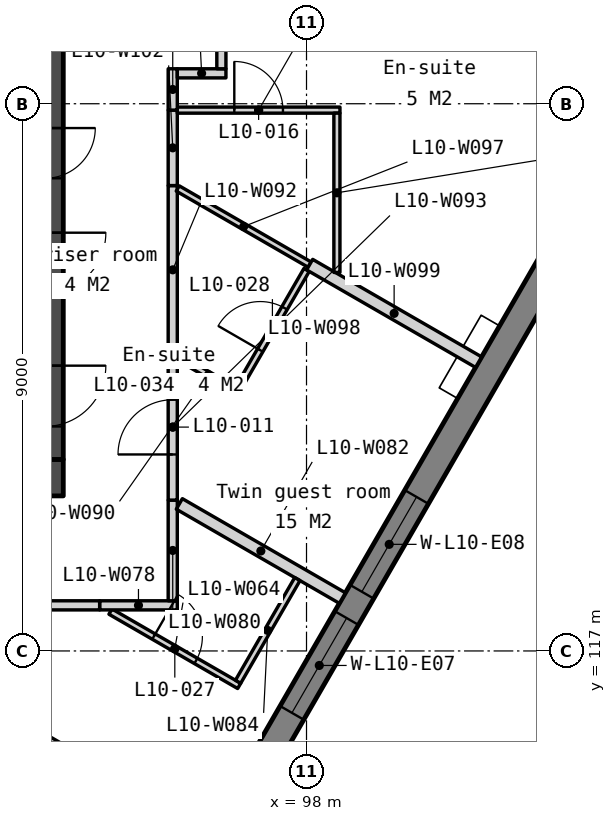
"""IFC4 building model, lengths in metres.
Left out: names, types, materials, properties, quantities, classifications, styles, units other than length and angle.
Written with IfcOpenShell. Run it as: python <this file> out.ifc"""

import sys

from ifc_helpers import new_model, si_unit, direction, frame, frame_2d, origin, place, context, subcontext, project, spatial, polyline, rectangle, outline, extrude, element, fill, save


model = new_model("IFC4")
c1 = context("Model", 3, precision=1e-05, world=origin(), true_north=direction((0.0, 1.0)))
c2 = subcontext(c1, "Body", "Model", "MODEL_VIEW")
j1 = project(units=[si_unit("LENGTHUNIT", "METRE"), si_unit("PLANEANGLEUNIT", "RADIAN")], contexts=[c1])
p1 = place(None, origin())
s1 = spatial("IfcSite", under=j1, at=p1, CompositionType="ELEMENT")
p2 = place(p1, origin())
s2 = spatial("IfcBuilding", under=s1, at=p2, CompositionType="ELEMENT")
p3 = place(p2, frame((0.0, 0.0, 49.0)))
s3 = spatial("IfcBuildingStorey", under=s2, at=p3, CompositionType="ELEMENT", Elevation=49.0)
p4 = place(p3, frame((66.0, 119.85, 0.0), z_axis=(0.0, 0.0, 1.0), x_axis=(1.0, 0.0, 0.0)))
e1 = element("IfcWall", 1, at=p4, inside=s3, PredefinedType="SOLIDWALL", context=c2, shape_type="SweptSolid", body=[
    extrude(rectangle(XDim=28.0, YDim=0.6, at=frame_2d((14.0, 0.0))), origin(), (0.0, 0.0, 1.0), 3.35),
])
p5 = place(p4, frame((6.825, 0.0, 0.0)))
e2 = element("IfcOpeningElement", 2, at=p5, cuts=e1, PredefinedType="OPENING", context=c2, shape_type="SweptSolid", body=[
    extrude(rectangle(XDim=1.8, YDim=2.1, at=frame_2d((0.9, 1.05))), frame((0.0, 0.31, 0.0), z_axis=(0.0, -1.0, 0.0), x_axis=(1.0, 0.0, 0.0)), (0.0, 0.0, 1.0), 0.62),
])
p6 = place(p4, frame((15.85, 0.0, 0.0)))
e3 = element("IfcOpeningElement", 3, at=p6, cuts=e1, PredefinedType="OPENING", context=c2, shape_type="SweptSolid", body=[
    extrude(rectangle(XDim=1.5, YDim=2.1, at=frame_2d((0.75, 1.05))), frame((0.0, 0.31, 0.0), z_axis=(0.0, -1.0, 0.0), x_axis=(1.0, 0.0, 0.0)), (0.0, 0.0, 1.0), 0.62),
])
p7 = place(p4, frame((19.375, 0.0, 0.0)))
e4 = element("IfcOpeningElement", 4, at=p7, cuts=e1, PredefinedType="OPENING", context=c2, shape_type="SweptSolid", body=[
    extrude(rectangle(XDim=1.8, YDim=2.1, at=frame_2d((0.9, 1.05))), frame((0.0, 0.31, 0.0), z_axis=(0.0, -1.0, 0.0), x_axis=(1.0, 0.0, 0.0)), (0.0, 0.0, 1.0), 0.62),
])
p8 = place(p4, frame((4.425, 0.0, 0.0)))
e5 = element("IfcOpeningElement", 5, at=p8, cuts=e1, PredefinedType="OPENING", context=c2, shape_type="SweptSolid", body=[
    extrude(rectangle(XDim=1.0, YDim=2.1, at=frame_2d((0.5, 1.05))), frame((0.0, 0.31, 0.0), z_axis=(0.0, -1.0, 0.0), x_axis=(1.0, 0.0, 0.0)), (0.0, 0.0, 1.0), 0.62),
])
p9 = place(p4, frame((9.783, 0.0, 0.0)))
e6 = element("IfcOpeningElement", 6, at=p9, cuts=e1, PredefinedType="OPENING", context=c2, shape_type="SweptSolid", body=[
    extrude(rectangle(XDim=1.0, YDim=2.1, at=frame_2d((0.5, 1.05))), frame((0.0, 0.31, 0.0), z_axis=(0.0, -1.0, 0.0), x_axis=(1.0, 0.0, 0.0)), (0.0, 0.0, 1.0), 0.62),
])
p10 = place(p4, frame((11.525, 0.0, 0.0)))
e7 = element("IfcOpeningElement", 7, at=p10, cuts=e1, PredefinedType="OPENING", context=c2, shape_type="SweptSolid", body=[
    extrude(rectangle(XDim=1.0, YDim=2.1, at=frame_2d((0.5, 1.05))), frame((0.0, 0.31, 0.0), z_axis=(0.0, -1.0, 0.0), x_axis=(1.0, 0.0, 0.0)), (0.0, 0.0, 1.0), 0.62),
])
p11 = place(p4, frame((13.658, 0.0, 0.0)))
e8 = element("IfcOpeningElement", 8, at=p11, cuts=e1, PredefinedType="OPENING", context=c2, shape_type="SweptSolid", body=[
    extrude(rectangle(XDim=1.0, YDim=2.1, at=frame_2d((0.5, 1.05))), frame((0.0, 0.31, 0.0), z_axis=(0.0, -1.0, 0.0), x_axis=(1.0, 0.0, 0.0)), (0.0, 0.0, 1.0), 0.62),
])
p12 = place(p4, frame((21.725, 0.0, 0.0)))
e9 = element("IfcOpeningElement", 9, at=p12, cuts=e1, PredefinedType="OPENING", context=c2, shape_type="SweptSolid", body=[
    extrude(rectangle(XDim=1.0, YDim=2.1, at=frame_2d((0.5, 1.05))), frame((0.0, 0.31, 0.0), z_axis=(0.0, -1.0, 0.0), x_axis=(1.0, 0.0, 0.0)), (0.0, 0.0, 1.0), 0.62),
])
p13 = place(p4, frame((23.425, 0.0, 0.0)))
e10 = element("IfcOpeningElement", 10, at=p13, cuts=e1, PredefinedType="OPENING", context=c2, shape_type="SweptSolid", body=[
    extrude(rectangle(XDim=1.0, YDim=2.1, at=frame_2d((0.5, 1.05))), frame((0.0, 0.31, 0.0), z_axis=(0.0, -1.0, 0.0), x_axis=(1.0, 0.0, 0.0)), (0.0, 0.0, 1.0), 0.62),
])
p14 = place(p3, frame((93.7, 133.95, 0.0), z_axis=(0.0, 0.0, 1.0), x_axis=(0.0, -1.0, 0.0)))
e11 = element("IfcWall", 11, at=p14, inside=s3, PredefinedType="SOLIDWALL", context=c2, shape_type="SweptSolid", body=[
    extrude(rectangle(XDim=13.8, YDim=0.6, at=frame_2d((6.9, 0.0))), origin(), (0.0, 0.0, 1.0), 3.35),
])
p15 = place(p14, frame((0.6, 0.0, 0.0)))
e12 = element("IfcOpeningElement", 12, at=p15, cuts=e11, PredefinedType="OPENING", context=c2, shape_type="SweptSolid", body=[
    extrude(rectangle(XDim=1.1, YDim=2.1, at=frame_2d((0.55, 1.05))), frame((0.0, 0.31, 0.0), z_axis=(0.0, -1.0, 0.0), x_axis=(1.0, 0.0, 0.0)), (0.0, 0.0, 1.0), 0.62),
])
p16 = place(p14, frame((8.35, 0.0, 0.0)))
e13 = element("IfcOpeningElement", 13, at=p16, cuts=e11, PredefinedType="OPENING", context=c2, shape_type="SweptSolid", body=[
    extrude(rectangle(XDim=0.826, YDim=2.1, at=frame_2d((0.413, 1.05))), frame((0.0, 0.31, 0.0), z_axis=(0.0, -1.0, 0.0), x_axis=(1.0, 0.0, 0.0)), (0.0, 0.0, 1.0), 0.62),
])
p17 = place(p14, frame((10.071, 0.0, 0.0)))
e14 = element("IfcOpeningElement", 14, at=p17, cuts=e11, PredefinedType="OPENING", context=c2, shape_type="SweptSolid", body=[
    extrude(rectangle(XDim=1.0, YDim=2.1, at=frame_2d((0.5, 1.05))), frame((0.0, 0.31, 0.0), z_axis=(0.0, -1.0, 0.0), x_axis=(1.0, 0.0, 0.0)), (0.0, 0.0, 1.0), 0.62),
])
p18 = place(p14, frame((12.258, 0.0, 0.0)))
e15 = element("IfcOpeningElement", 15, at=p18, cuts=e11, PredefinedType="OPENING", context=c2, shape_type="SweptSolid", body=[
    extrude(rectangle(XDim=1.0, YDim=2.1, at=frame_2d((0.5, 1.05))), frame((0.0, 0.31, 0.0), z_axis=(0.0, -1.0, 0.0), x_axis=(1.0, 0.0, 0.0)), (0.0, 0.0, 1.0), 0.62),
])
p19 = place(p3, frame((83.105, 90.599, -0.15), z_axis=(0.0, 0.0, 1.0), x_axis=(0.499999201451, 0.866025864826, 0.0)))
e16 = element("IfcWall", 16, at=p19, inside=s3, PredefinedType="SOLIDWALL", context=c2, shape_type="SweptSolid", body=[
    extrude(outline(polyline([(44.8, 0.0), (44.8, 3.5), (0.0, 3.5), (0.0, 0.0), (44.8, 0.0)])), frame((0.0, 0.225, 0.0), z_axis=(0.0, -1.0, 0.0), x_axis=(1.0, 0.0, 0.0)), (0.0, 0.0, 1.0), 0.45),
])
p20 = place(p19, frame((2.43, 0.0, 1.05)))
e17 = element("IfcOpeningElement", 17, at=p20, cuts=e16, PredefinedType="OPENING", context=c2, shape_type="SweptSolid", body=[
    extrude(rectangle(XDim=1.8, YDim=1.5, at=frame_2d((0.9, 0.75))), frame((0.0, 0.235, 0.0), z_axis=(0.0, -1.0, 0.0), x_axis=(1.0, 0.0, 0.0)), (0.0, 0.0, 1.0), 0.47),
])
p21 = place(p19, frame((4.73, 0.0, 1.05)))
e18 = element("IfcOpeningElement", 18, at=p21, cuts=e16, PredefinedType="OPENING", context=c2, shape_type="SweptSolid", body=[
    extrude(rectangle(XDim=1.8, YDim=1.5, at=frame_2d((0.9, 0.75))), frame((0.0, 0.235, 0.0), z_axis=(0.0, -1.0, 0.0), x_axis=(1.0, 0.0, 0.0)), (0.0, 0.0, 1.0), 0.47),
])
p22 = place(p19, frame((11.39, 0.0, 1.05)))
e19 = element("IfcOpeningElement", 19, at=p22, cuts=e16, PredefinedType="OPENING", context=c2, shape_type="SweptSolid", body=[
    extrude(rectangle(XDim=1.8, YDim=1.5, at=frame_2d((0.9, 0.75))), frame((0.0, 0.235, 0.0), z_axis=(0.0, -1.0, 0.0), x_axis=(1.0, 0.0, 0.0)), (0.0, 0.0, 1.0), 0.47),
])
p23 = place(p19, frame((13.69, 0.0, 1.05)))
e20 = element("IfcOpeningElement", 20, at=p23, cuts=e16, PredefinedType="OPENING", context=c2, shape_type="SweptSolid", body=[
    extrude(rectangle(XDim=1.8, YDim=1.5, at=frame_2d((0.9, 0.75))), frame((0.0, 0.235, 0.0), z_axis=(0.0, -1.0, 0.0), x_axis=(1.0, 0.0, 0.0)), (0.0, 0.0, 1.0), 0.47),
])
p24 = place(p19, frame((20.35, 0.0, 1.05)))
e21 = element("IfcOpeningElement", 21, at=p24, cuts=e16, PredefinedType="OPENING", context=c2, shape_type="SweptSolid", body=[
    extrude(rectangle(XDim=1.8, YDim=1.5, at=frame_2d((0.9, 0.75))), frame((0.0, 0.235, 0.0), z_axis=(0.0, -1.0, 0.0), x_axis=(1.0, 0.0, 0.0)), (0.0, 0.0, 1.0), 0.47),
])
p25 = place(p19, frame((22.65, 0.0, 1.05)))
e22 = element("IfcOpeningElement", 22, at=p25, cuts=e16, PredefinedType="OPENING", context=c2, shape_type="SweptSolid", body=[
    extrude(rectangle(XDim=1.8, YDim=1.5, at=frame_2d((0.9, 0.75))), frame((0.0, 0.235, 0.0), z_axis=(0.0, -1.0, 0.0), x_axis=(1.0, 0.0, 0.0)), (0.0, 0.0, 1.0), 0.47),
])
p26 = place(p19, frame((29.31, 0.0, 1.05)))
e23 = element("IfcOpeningElement", 23, at=p26, cuts=e16, PredefinedType="OPENING", context=c2, shape_type="SweptSolid", body=[
    extrude(rectangle(XDim=1.8, YDim=1.5, at=frame_2d((0.9, 0.75))), frame((0.0, 0.235, 0.0), z_axis=(0.0, -1.0, 0.0), x_axis=(1.0, 0.0, 0.0)), (0.0, 0.0, 1.0), 0.47),
])
p27 = place(p19, frame((31.61, 0.0, 1.05)))
e24 = element("IfcOpeningElement", 24, at=p27, cuts=e16, PredefinedType="OPENING", context=c2, shape_type="SweptSolid", body=[
    extrude(rectangle(XDim=1.8, YDim=1.5, at=frame_2d((0.9, 0.75))), frame((0.0, 0.235, 0.0), z_axis=(0.0, -1.0, 0.0), x_axis=(1.0, 0.0, 0.0)), (0.0, 0.0, 1.0), 0.47),
])
p28 = place(p19, frame((38.27, 0.0, 1.05)))
e25 = element("IfcOpeningElement", 25, at=p28, cuts=e16, PredefinedType="OPENING", context=c2, shape_type="SweptSolid", body=[
    extrude(rectangle(XDim=1.8, YDim=1.5, at=frame_2d((0.9, 0.75))), frame((0.0, 0.235, 0.0), z_axis=(0.0, -1.0, 0.0), x_axis=(1.0, 0.0, 0.0)), (0.0, 0.0, 1.0), 0.47),
])
p29 = place(p19, frame((40.57, 0.0, 1.05)))
e26 = element("IfcOpeningElement", 26, at=p29, cuts=e16, PredefinedType="OPENING", context=c2, shape_type="SweptSolid", body=[
    extrude(rectangle(XDim=1.8, YDim=1.5, at=frame_2d((0.9, 0.75))), frame((0.0, 0.235, 0.0), z_axis=(0.0, -1.0, 0.0), x_axis=(1.0, 0.0, 0.0)), (0.0, 0.0, 1.0), 0.47),
])
p30 = place(p3, frame((92.497, 116.215, 0.0), z_axis=(0.0, 0.0, 1.0), x_axis=(0.866012907634, -0.500021643343, 0.0)))
e27 = element("IfcWall", 27, at=p30, inside=s3, PredefinedType="PARTITIONING", context=c2, shape_type="SweptSolid", body=[
    extrude(rectangle(XDim=4.45, YDim=0.2, at=frame_2d((2.225, 0.0))), origin(), (0.0, 0.0, 1.0), 3.35),
])
p31 = place(p3, frame((94.775, 117.647, 0.0), z_axis=(0.0, 0.0, 1.0), x_axis=(0.86604092097, -0.499973122483, 0.0)))
e28 = element("IfcWall", 28, at=p31, inside=s3, PredefinedType="PARTITIONING", context=c2, shape_type="SweptSolid", body=[
    extrude(rectangle(XDim=2.445, YDim=0.1, at=frame_2d((1.223, 0.0))), origin(), (0.0, 0.0, 1.0), 3.35),
])
p32 = place(p31, frame((0.823, 0.0, 0.0)))
e29 = element("IfcOpeningElement", 29, at=p32, cuts=e28, PredefinedType="OPENING", context=c2, shape_type="SweptSolid", body=[
    extrude(rectangle(XDim=0.8, YDim=2.1, at=frame_2d((0.4, 1.05))), frame((0.0, 0.06, 0.0), z_axis=(0.0, -1.0, 0.0), x_axis=(1.0, 0.0, 0.0)), (0.0, 0.0, 1.0), 0.12),
])
p33 = place(p3, frame((94.598, 117.75, 0.0), z_axis=(0.0, 0.0, 1.0), x_axis=(1.0, 0.0, 0.0)))
e30 = element("IfcWall", 30, at=p33, inside=s3, PredefinedType="PARTITIONING", context=c2, shape_type="SweptSolid", body=[
    extrude(rectangle(XDim=1.277, YDim=0.15, at=frame_2d((0.639, 0.0))), origin(), (0.0, 0.0, 1.0), 3.35),
])
p34 = place(p3, frame((90.034, 117.75, 0.0), z_axis=(0.0, 0.0, 1.0), x_axis=(1.0, 0.0, 0.0)))
e31 = element("IfcWall", 31, at=p34, inside=s3, PredefinedType="PARTITIONING", context=c2, shape_type="SweptSolid", body=[
    extrude(rectangle(XDim=4.564, YDim=0.15, at=frame_2d((2.282, 0.0))), origin(), (0.0, 0.0, 1.0), 3.35),
])
p35 = place(p34, frame((1.832, 0.0, 0.0)))
e32 = element("IfcOpeningElement", 32, at=p35, cuts=e31, PredefinedType="OPENING", context=c2, shape_type="SweptSolid", body=[
    extrude(rectangle(XDim=0.9, YDim=2.1, at=frame_2d((0.45, 1.05))), frame((0.0, 0.085, 0.0), z_axis=(0.0, -1.0, 0.0), x_axis=(1.0, 0.0, 0.0)), (0.0, 0.0, 1.0), 0.17),
])
p36 = place(p3, frame((95.8, 117.825, 0.0), z_axis=(0.0, 0.0, 1.0), x_axis=(0.0, 1.0, 0.0)))
e33 = element("IfcWall", 33, at=p36, inside=s3, PredefinedType="PARTITIONING", context=c2, shape_type="SweptSolid", body=[
    extrude(rectangle(XDim=1.656, YDim=0.15, at=frame_2d((0.828, 0.0))), origin(), (0.0, 0.0, 1.0), 3.35),
])
p37 = place(p3, frame((95.908, 119.418, 0.0), z_axis=(0.0, 0.0, 1.0), x_axis=(0.866051688794, -0.499954470265, 0.0)))
e34 = element("IfcWall", 34, at=p37, inside=s3, PredefinedType="PARTITIONING", context=c2, shape_type="SweptSolid", body=[
    extrude(rectangle(XDim=3.097, YDim=0.2, at=frame_2d((1.548, 0.0))), origin(), (0.0, 0.0, 1.0), 3.35),
])
p38 = place(p3, frame((96.875, 116.493, 0.0), z_axis=(0.0, 0.0, 1.0), x_axis=(0.500043961785, 0.866000020948, 0.0)))
e35 = element("IfcWall", 35, at=p38, inside=s3, PredefinedType="PARTITIONING", context=c2, shape_type="SweptSolid", body=[
    extrude(rectangle(XDim=1.95, YDim=0.1, at=frame_2d((0.975, 0.0))), origin(), (0.0, 0.0, 1.0), 3.35),
])
p39 = place(p3, frame((95.882, 121.835, 0.0), z_axis=(0.0, 0.0, 1.0), x_axis=(0.86601174498, -0.500023656998, 0.0)))
e36 = element("IfcWall", 36, at=p39, inside=s3, PredefinedType="PARTITIONING", context=c2, shape_type="SweptSolid", body=[
    extrude(rectangle(XDim=1.169, YDim=0.1, at=frame_2d((0.585, 0.0))), origin(), (0.0, 0.0, 1.0), 3.35),
])
p40 = place(p3, frame((95.8, 121.883, 0.0), z_axis=(0.0, 0.0, 1.0), x_axis=(0.0, 1.0, 0.0)))
e37 = element("IfcWall", 37, at=p40, inside=s3, PredefinedType="PARTITIONING", context=c2, shape_type="SweptSolid", body=[
    extrude(rectangle(XDim=2.771, YDim=0.15, at=frame_2d((1.386, 0.0))), origin(), (0.0, 0.0, 1.0), 3.35),
])
p41 = place(p3, frame((95.8, 119.481, 0.0), z_axis=(0.0, 0.0, 1.0), x_axis=(0.0, 1.0, 0.0)))
e38 = element("IfcWall", 38, at=p41, inside=s3, PredefinedType="PARTITIONING", context=c2, shape_type="SweptSolid", body=[
    extrude(rectangle(XDim=2.402, YDim=0.15, at=frame_2d((1.201, 0.0))), origin(), (0.0, 0.0, 1.0), 3.35),
])
p42 = place(p41, frame((0.751, 0.0, 0.0)))
e39 = element("IfcOpeningElement", 39, at=p42, cuts=e38, PredefinedType="OPENING", context=c2, shape_type="SweptSolid", body=[
    extrude(rectangle(XDim=0.9, YDim=2.1, at=frame_2d((0.45, 1.05))), frame((0.0, 0.085, 0.0), z_axis=(0.0, -1.0, 0.0), x_axis=(1.0, 0.0, 0.0)), (0.0, 0.0, 1.0), 0.17),
])
p43 = place(p3, frame((95.882, 124.606, 0.0), z_axis=(0.0, 0.0, 1.0), x_axis=(0.866039519639, -0.499975549825, 0.0)))
e40 = element("IfcWall", 40, at=p43, inside=s3, PredefinedType="PARTITIONING", context=c2, shape_type="SweptSolid", body=[
    extrude(rectangle(XDim=2.505, YDim=0.1, at=frame_2d((1.252, 0.0))), origin(), (0.0, 0.0, 1.0), 3.35),
])
p44 = place(p3, frame((96.877, 121.319, 0.0), z_axis=(0.0, 0.0, 1.0), x_axis=(0.499966648284, 0.866044658551, 0.0)))
e41 = element("IfcWall", 41, at=p44, inside=s3, PredefinedType="PARTITIONING", context=c2, shape_type="SweptSolid", body=[
    extrude(rectangle(XDim=2.25, YDim=0.1, at=frame_2d((1.125, 0.0))), origin(), (0.0, 0.0, 1.0), 3.35),
])
p45 = place(p44, frame((0.725, 0.0, 0.0)))
e42 = element("IfcOpeningElement", 42, at=p45, cuts=e41, PredefinedType="OPENING", context=c2, shape_type="SweptSolid", body=[
    extrude(rectangle(XDim=0.8, YDim=2.1, at=frame_2d((0.4, 1.05))), frame((0.0, 0.06, 0.0), z_axis=(0.0, -1.0, 0.0), x_axis=(1.0, 0.0, 0.0)), (0.0, 0.0, 1.0), 0.12),
])
p46 = place(p3, frame((98.052, 123.354, 0.0), z_axis=(0.0, 0.0, 1.0), x_axis=(0.866019585306, -0.500010077765, 0.0)))
e43 = element("IfcWall", 43, at=p46, inside=s3, PredefinedType="PARTITIONING", context=c2, shape_type="SweptSolid", body=[
    extrude(rectangle(XDim=3.208, YDim=0.2, at=frame_2d((1.604, 0.0))), origin(), (0.0, 0.0, 1.0), 3.35),
])
p47 = place(p3, frame((95.8, 124.654, 0.0), z_axis=(0.0, 0.0, 1.0), x_axis=(0.0, 1.0, 0.0)))
e44 = element("IfcWall", 44, at=p47, inside=s3, PredefinedType="PARTITIONING", context=c2, shape_type="SweptSolid", body=[
    extrude(rectangle(XDim=1.241, YDim=0.15, at=frame_2d((0.621, 0.0))), origin(), (0.0, 0.0, 1.0), 3.35),
])
p48 = place(p3, frame((95.875, 125.895, 0.0), z_axis=(0.0, 0.0, 1.0), x_axis=(1.0, 0.0, 0.0)))
e45 = element("IfcWall", 45, at=p48, inside=s3, PredefinedType="PARTITIONING", context=c2, shape_type="SweptSolid", body=[
    extrude(rectangle(XDim=2.675, YDim=0.1, at=frame_2d((1.337, 0.0))), origin(), (0.0, 0.0, 1.0), 3.35),
])
p49 = place(p48, frame((0.938, 0.0, 0.0)))
e46 = element("IfcOpeningElement", 46, at=p49, cuts=e45, PredefinedType="OPENING", context=c2, shape_type="SweptSolid", body=[
    extrude(rectangle(XDim=0.8, YDim=2.1, at=frame_2d((0.4, 1.05))), frame((0.0, 0.06, 0.0), z_axis=(0.0, -1.0, 0.0), x_axis=(1.0, 0.0, 0.0)), (0.0, 0.0, 1.0), 0.12),
])
p50 = place(p3, frame((98.5, 123.225, 0.0), z_axis=(0.0, 0.0, 1.0), x_axis=(0.0, 1.0, 0.0)))
e47 = element("IfcWall", 47, at=p50, inside=s3, PredefinedType="PARTITIONING", context=c2, shape_type="SweptSolid", body=[
    extrude(rectangle(XDim=2.62, YDim=0.1, at=frame_2d((1.31, 0.0))), origin(), (0.0, 0.0, 1.0), 3.35),
])
p51 = place(p3, frame((95.8, 125.895, 0.0), z_axis=(0.0, 0.0, 1.0), x_axis=(0.0, 1.0, 0.0)))
e48 = element("IfcWall", 48, at=p51, inside=s3, PredefinedType="PARTITIONING", context=c2, shape_type="SweptSolid", body=[
    extrude(rectangle(XDim=0.68, YDim=0.15, at=frame_2d((0.34, 0.0))), origin(), (0.0, 0.0, 1.0), 3.35),
])
p52 = place(p3, frame((95.875, 126.5, 0.0), z_axis=(0.0, 0.0, 1.0), x_axis=(1.0, 0.0, 0.0)))
e49 = element("IfcWall", 49, at=p52, inside=s3, PredefinedType="PARTITIONING", context=c2, shape_type="SweptSolid", body=[
    extrude(rectangle(XDim=0.8, YDim=0.15, at=frame_2d((0.4, 0.0))), origin(), (0.0, 0.0, 1.0), 3.35),
])
p53 = place(p3, frame((96.6, 133.925, 0.0), z_axis=(0.0, 0.0, 1.0), x_axis=(6.643194e-05, -0.999999997793, 0.0)))
e50 = element("IfcWall", 50, at=p53, inside=s3, PredefinedType="PARTITIONING", context=c2, shape_type="SweptSolid", body=[
    extrude(rectangle(XDim=7.35, YDim=0.15, at=frame_2d((3.675, 0.0))), origin(), (0.0, 0.0, 1.0), 3.35),
])
p54 = place(p53, frame((3.175, 0.0, 0.0)))
e51 = element("IfcOpeningElement", 51, at=p54, cuts=e50, PredefinedType="OPENING", context=c2, shape_type="SweptSolid", body=[
    extrude(rectangle(XDim=1.0, YDim=2.1, at=frame_2d((0.5, 1.05))), frame((0.0, 0.085, 0.0), z_axis=(0.0, -1.0, 0.0), x_axis=(1.0, 0.0, 0.0)), (0.0, 0.0, 1.0), 0.17),
])
p55 = place(p26, origin())
e52 = element("IfcWindow", 52, at=p55, inside=s3, PartitioningType="SINGLE_PANEL", PredefinedType="WINDOW", context=c2, shape_type="SweptSolid", body=[
    extrude(rectangle(XDim=1.8, YDim=1.5, at=frame_2d((0.9, 0.75))), frame((0.0, 0.03, 0.0), z_axis=(0.0, -1.0, 0.0), x_axis=(1.0, 0.0, 0.0)), (0.0, 0.0, 1.0), 0.06),
])
fill(e23, e52)
p56 = place(p27, origin())
e53 = element("IfcWindow", 53, at=p56, inside=s3, PartitioningType="SINGLE_PANEL", PredefinedType="WINDOW", context=c2, shape_type="SweptSolid", body=[
    extrude(rectangle(XDim=1.8, YDim=1.5, at=frame_2d((0.9, 0.75))), frame((0.0, 0.03, 0.0), z_axis=(0.0, -1.0, 0.0), x_axis=(1.0, 0.0, 0.0)), (0.0, 0.0, 1.0), 0.06),
])
fill(e24, e53)
p57 = place(p42, origin())
e54 = element("IfcDoor", 54, at=p57, inside=s3, OperationType="SINGLE_SWING_LEFT", PredefinedType="DOOR", context=c2, shape_type="SweptSolid", body=[
    extrude(rectangle(XDim=0.9, YDim=2.1, at=frame_2d((0.45, 1.05))), frame((0.0, 0.025, 0.0), z_axis=(0.0, -1.0, 0.0), x_axis=(1.0, 0.0, 0.0)), (0.0, 0.0, 1.0), 0.05),
])
fill(e39, e54)
p58 = place(p49, origin())
e55 = element("IfcDoor", 55, at=p58, inside=s3, OperationType="SINGLE_SWING_LEFT", PredefinedType="DOOR", context=c2, shape_type="SweptSolid", body=[
    extrude(rectangle(XDim=0.8, YDim=2.1, at=frame_2d((0.4, 1.05))), frame((0.0, 0.025, 0.0), z_axis=(0.0, -1.0, 0.0), x_axis=(1.0, 0.0, 0.0)), (0.0, 0.0, 1.0), 0.05),
])
fill(e46, e55)
p59 = place(p32, origin())
e56 = element("IfcDoor", 56, at=p59, inside=s3, OperationType="SINGLE_SWING_LEFT", PredefinedType="DOOR", context=c2, shape_type="SweptSolid", body=[
    extrude(rectangle(XDim=0.8, YDim=2.1, at=frame_2d((0.4, 1.05))), frame((0.0, 0.025, 0.0), z_axis=(0.0, -1.0, 0.0), x_axis=(1.0, 0.0, 0.0)), (0.0, 0.0, 1.0), 0.05),
])
fill(e29, e56)
p60 = place(p45, origin())
e57 = element("IfcDoor", 57, at=p60, inside=s3, OperationType="SINGLE_SWING_LEFT", PredefinedType="DOOR", context=c2, shape_type="SweptSolid", body=[
    extrude(rectangle(XDim=0.8, YDim=2.1, at=frame_2d((0.4, 1.05))), frame((0.0, 0.025, 0.0), z_axis=(0.0, -1.0, 0.0), x_axis=(1.0, 0.0, 0.0)), (0.0, 0.0, 1.0), 0.05),
])
fill(e42, e57)
save(model, sys.argv[1])
